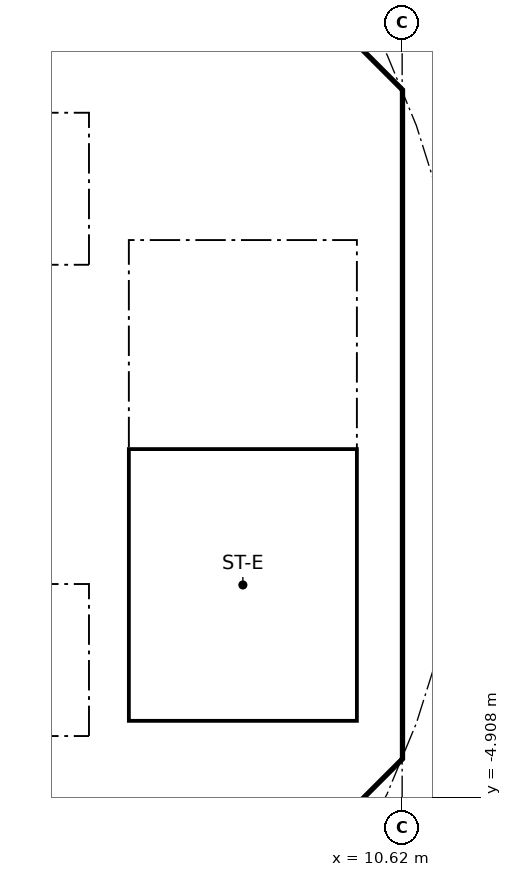
"""IFC4 building model, lengths in metres.
Left out: names, types, materials, properties, quantities, classifications, styles, units other than length and angle.
Written with IfcOpenShell. Run it as: python <this file> out.ifc"""

import sys

from ifc_helpers import new_model, si_unit, direction, frame, frame_2d, origin, place, context, subcontext, project, spatial, polyline, rectangle, outline, extrude, element, fill, save


model = new_model("IFC4")
c1 = context("Model", 3, precision=1e-05, world=origin(), true_north=direction((0.0, 1.0)))
c2 = subcontext(c1, "Body", "Model", "MODEL_VIEW")
j1 = project(units=[si_unit("LENGTHUNIT", "METRE"), si_unit("PLANEANGLEUNIT", "RADIAN")], contexts=[c1])
p1 = place(None, origin())
s1 = spatial("IfcSite", under=j1, at=p1, CompositionType="ELEMENT")
p2 = place(p1, origin())
s2 = spatial("IfcBuilding", under=s1, at=p2, CompositionType="ELEMENT")
p3 = place(p2, frame((0.0, 0.0, 284.4)))
s3 = spatial("IfcBuildingStorey", under=s2, at=p3, CompositionType="ELEMENT", Elevation=284.4)
p4 = place(p3, frame((9.988, 4.613, 0.0), z_axis=(0.0, 0.0, 1.0), x_axis=(-0.707106781187, 0.707106781187, 0.0)))
e1 = element("IfcWall", 1, at=p4, inside=s3, PredefinedType="SHEAR", context=c2, shape_type="SweptSolid", body=[
    extrude(rectangle(XDim=7.602, YDim=0.6, at=frame_2d((3.801, 0.0))), origin(), (0.0, 0.0, 1.0), 3.44),
])
p5 = place(p4, frame((3.201, 0.0, 0.0)))
e2 = element("IfcOpeningElement", 2, at=p5, cuts=e1, PredefinedType="OPENING", context=c2, shape_type="SweptSolid", body=[
    extrude(rectangle(XDim=1.2, YDim=2.1, at=frame_2d((0.6, 1.05))), frame((0.0, 0.31, 0.0), z_axis=(0.0, -1.0, 0.0), x_axis=(1.0, 0.0, 0.0)), (0.0, 0.0, 1.0), 0.62),
])
p6 = place(p3, frame((4.613, -9.988, 0.0), z_axis=(0.0, 0.0, 1.0), x_axis=(0.707106781187, 0.707106781187, 0.0)))
e3 = element("IfcWall", 3, at=p6, inside=s3, PredefinedType="SHEAR", context=c2, shape_type="SweptSolid", body=[
    extrude(rectangle(XDim=7.602, YDim=0.6, at=frame_2d((3.801, 0.0))), origin(), (0.0, 0.0, 1.0), 3.44),
])
p7 = place(p6, frame((3.201, 0.0, 0.0)))
e4 = element("IfcOpeningElement", 4, at=p7, cuts=e3, PredefinedType="OPENING", context=c2, shape_type="SweptSolid", body=[
    extrude(rectangle(XDim=1.2, YDim=2.1, at=frame_2d((0.6, 1.05))), frame((0.0, 0.31, 0.0), z_axis=(0.0, -1.0, 0.0), x_axis=(1.0, 0.0, 0.0)), (0.0, 0.0, 1.0), 0.62),
])
p8 = place(p3, frame((-6.7, 2.0, 0.0), z_axis=(0.0, 0.0, 1.0), x_axis=(1.0, 0.0, 0.0)))
e5 = element("IfcWall", 5, at=p8, inside=s3, PredefinedType="SOLIDWALL", context=c2, shape_type="SweptSolid", body=[
    extrude(rectangle(XDim=13.4, YDim=0.2, at=frame_2d((6.7, 0.0))), origin(), (0.0, 0.0, 1.0), 3.44),
])
p9 = place(p8, frame((11.65, 0.0, 0.0)))
e6 = element("IfcOpeningElement", 6, at=p9, cuts=e5, PredefinedType="OPENING", context=c2, shape_type="SweptSolid", body=[
    extrude(rectangle(XDim=1.1, YDim=2.1, at=frame_2d((0.55, 1.05))), frame((0.0, 0.11, 0.0), z_axis=(0.0, -1.0, 0.0), x_axis=(1.0, 0.0, 0.0)), (0.0, 0.0, 1.0), 0.22),
])
p10 = place(p8, frame((1.85, 0.0, 0.0)))
e7 = element("IfcOpeningElement", 7, at=p10, cuts=e5, PredefinedType="OPENING", context=c2, shape_type="SweptSolid", body=[
    extrude(rectangle(XDim=0.9, YDim=2.1, at=frame_2d((0.45, 1.05))), frame((0.0, 0.11, 0.0), z_axis=(0.0, -1.0, 0.0), x_axis=(1.0, 0.0, 0.0)), (0.0, 0.0, 1.0), 0.22),
])
p11 = place(p8, frame((5.15, 0.0, 0.0)))
e8 = element("IfcOpeningElement", 8, at=p11, cuts=e5, PredefinedType="OPENING", context=c2, shape_type="SweptSolid", body=[
    extrude(rectangle(XDim=0.9, YDim=2.1, at=frame_2d((0.45, 1.05))), frame((0.0, 0.11, 0.0), z_axis=(0.0, -1.0, 0.0), x_axis=(1.0, 0.0, 0.0)), (0.0, 0.0, 1.0), 0.22),
])
p12 = place(p8, frame((8.45, 0.0, 0.0)))
e9 = element("IfcOpeningElement", 9, at=p12, cuts=e5, PredefinedType="OPENING", context=c2, shape_type="SweptSolid", body=[
    extrude(rectangle(XDim=0.9, YDim=2.1, at=frame_2d((0.45, 1.05))), frame((0.0, 0.11, 0.0), z_axis=(0.0, -1.0, 0.0), x_axis=(1.0, 0.0, 0.0)), (0.0, 0.0, 1.0), 0.22),
])
p13 = place(p3, frame((6.7, 4.0, 0.0), z_axis=(0.0, 0.0, 1.0), x_axis=(1.0, 0.0, 0.0)))
e10 = element("IfcWall", 10, at=p13, inside=s3, PredefinedType="SOLIDWALL", context=c2, shape_type="SweptSolid", body=[
    extrude(rectangle(XDim=3.325, YDim=0.2, at=frame_2d((1.662, 0.0))), origin(), (0.0, 0.0, 1.0), 3.44),
])
p14 = place(p13, frame((1.25, 0.0, 0.0)))
e11 = element("IfcOpeningElement", 11, at=p14, cuts=e10, PredefinedType="OPENING", context=c2, shape_type="SweptSolid", body=[
    extrude(rectangle(XDim=1.1, YDim=2.1, at=frame_2d((0.55, 1.05))), frame((0.0, 0.11, 0.0), z_axis=(0.0, -1.0, 0.0), x_axis=(1.0, 0.0, 0.0)), (0.0, 0.0, 1.0), 0.22),
])
p15 = place(p3, frame((-6.7, -2.0, 0.0), z_axis=(0.0, 0.0, 1.0), x_axis=(1.0, 0.0, 0.0)))
e12 = element("IfcWall", 12, at=p15, inside=s3, PredefinedType="SOLIDWALL", context=c2, shape_type="SweptSolid", body=[
    extrude(rectangle(XDim=13.4, YDim=0.2, at=frame_2d((6.7, 0.0))), origin(), (0.0, 0.0, 1.0), 3.44),
])
p16 = place(p15, frame((9.45, 0.0, 0.0)))
e13 = element("IfcOpeningElement", 13, at=p16, cuts=e12, PredefinedType="OPENING", context=c2, shape_type="SweptSolid", body=[
    extrude(rectangle(XDim=1.1, YDim=2.1, at=frame_2d((0.55, 1.05))), frame((0.0, 0.11, 0.0), z_axis=(0.0, -1.0, 0.0), x_axis=(1.0, 0.0, 0.0)), (0.0, 0.0, 1.0), 0.22),
])
p17 = place(p15, frame((11.65, 0.0, 0.0)))
e14 = element("IfcOpeningElement", 14, at=p17, cuts=e12, PredefinedType="OPENING", context=c2, shape_type="SweptSolid", body=[
    extrude(rectangle(XDim=1.1, YDim=2.1, at=frame_2d((0.55, 1.05))), frame((0.0, 0.11, 0.0), z_axis=(0.0, -1.0, 0.0), x_axis=(1.0, 0.0, 0.0)), (0.0, 0.0, 1.0), 0.22),
])
p18 = place(p15, frame((1.85, 0.0, 0.0)))
e15 = element("IfcOpeningElement", 15, at=p18, cuts=e12, PredefinedType="OPENING", context=c2, shape_type="SweptSolid", body=[
    extrude(rectangle(XDim=0.9, YDim=2.1, at=frame_2d((0.45, 1.05))), frame((0.0, 0.11, 0.0), z_axis=(0.0, -1.0, 0.0), x_axis=(1.0, 0.0, 0.0)), (0.0, 0.0, 1.0), 0.22),
])
p19 = place(p15, frame((5.15, 0.0, 0.0)))
e16 = element("IfcOpeningElement", 16, at=p19, cuts=e12, PredefinedType="OPENING", context=c2, shape_type="SweptSolid", body=[
    extrude(rectangle(XDim=0.9, YDim=2.1, at=frame_2d((0.45, 1.05))), frame((0.0, 0.11, 0.0), z_axis=(0.0, -1.0, 0.0), x_axis=(1.0, 0.0, 0.0)), (0.0, 0.0, 1.0), 0.22),
])
p20 = place(p15, frame((7.35, 0.0, 0.0)))
e17 = element("IfcOpeningElement", 17, at=p20, cuts=e12, PredefinedType="OPENING", context=c2, shape_type="SweptSolid", body=[
    extrude(rectangle(XDim=0.9, YDim=2.1, at=frame_2d((0.45, 1.05))), frame((0.0, 0.11, 0.0), z_axis=(0.0, -1.0, 0.0), x_axis=(1.0, 0.0, 0.0)), (0.0, 0.0, 1.0), 0.22),
])
p21 = place(p3, origin())
e18 = element("IfcWall", 18, at=p21, inside=s3, PredefinedType="SHEAR", context=c2, shape_type="SweptSolid", body=[
    extrude(outline(polyline([(9.776, -4.401), (10.025, -4.152), (10.025, -3.801), (10.025, 4.152), (9.776, 4.401), (10.2, 4.825), (10.625, 4.401), (10.625, -4.401), (10.2, -4.825), (9.776, -4.401)])), origin(), (0.0, 0.0, 1.0), 3.44),
])
p22 = place(p3, origin())
e19 = element("IfcWall", 19, at=p22, inside=s3, PredefinedType="SOLIDWALL", context=c2, shape_type="SweptSolid", body=[
    extrude(outline(polyline([(-6.7, 4.3), (6.7, 4.3), (6.7, 2.1), (6.5, 2.1), (6.5, 4.1), (4.5, 4.1), (4.5, 2.1), (4.3, 2.1), (4.3, 4.1), (0.1, 4.1), (0.1, 2.1), (-0.1, 2.1), (-0.1, 4.1), (-2.1, 4.1), (-2.1, 2.1), (-2.3, 2.1), (-2.3, 4.1), (-6.5, 4.1), (-6.5, 2.1), (-6.7, 2.1), (-6.7, 4.3)])), origin(), (0.0, 0.0, 1.0), 3.44),
])
p23 = place(p3, origin())
e20 = element("IfcWall", 20, at=p23, inside=s3, PredefinedType="SOLIDWALL", context=c2, shape_type="SweptSolid", body=[
    extrude(outline(polyline([(-6.7, -2.1), (-6.5, -2.1), (-6.5, -4.1), (-2.3, -4.1), (-2.3, -2.1), (-2.1, -2.1), (-2.1, -4.1), (-0.1, -4.1), (-0.1, -2.1), (0.1, -2.1), (0.1, -4.1), (2.1, -4.1), (2.1, -2.1), (2.3, -2.1), (2.3, -4.1), (4.3, -4.1), (4.3, -2.1), (4.5, -2.1), (4.5, -4.1), (6.5, -4.1), (6.5, -2.1), (6.7, -2.1), (6.7, -4.3), (-6.7, -4.3), (-6.7, -2.1)])), origin(), (0.0, 0.0, 1.0), 3.44),
])
p24 = place(p3, origin())
e21 = element("IfcWall", 21, at=p24, inside=s3, PredefinedType="SOLIDWALL", context=c2, shape_type="SweptSolid", body=[
    extrude(outline(polyline([(7.025, -3.9), (6.7, -3.9), (6.7, 3.9), (7.025, 3.9), (7.025, -3.9)])), origin(), (0.0, 0.0, 1.0), 3.44),
])
p25 = place(p3, origin())
e22 = element("IfcWall", 22, at=p25, inside=s3, PredefinedType="SOLIDWALL", context=c2, shape_type="SweptSolid", body=[
    extrude(outline(polyline([(10.025, -4.1), (6.7, -4.1), (6.7, -3.9), (10.025, -3.9), (10.025, -4.1)])), origin(), (0.0, 0.0, 1.0), 3.44),
])
p26 = place(p9, origin())
e23 = element("IfcDoor", 23, at=p26, inside=s3, OperationType="DOUBLE_DOOR_SLIDING", PredefinedType="DOOR", context=c2, shape_type="SweptSolid", body=[
    extrude(rectangle(XDim=1.1, YDim=2.1, at=frame_2d((0.55, 1.05))), frame((0.0, 0.025, 0.0), z_axis=(0.0, -1.0, 0.0), x_axis=(1.0, 0.0, 0.0)), (0.0, 0.0, 1.0), 0.05),
])
fill(e6, e23)
p27 = place(p17, origin())
e24 = element("IfcDoor", 24, at=p27, inside=s3, OperationType="DOUBLE_DOOR_SLIDING", PredefinedType="DOOR", context=c2, shape_type="SweptSolid", body=[
    extrude(rectangle(XDim=1.1, YDim=2.1, at=frame_2d((0.55, 1.05))), frame((0.0, 0.025, 0.0), z_axis=(0.0, -1.0, 0.0), x_axis=(1.0, 0.0, 0.0)), (0.0, 0.0, 1.0), 0.05),
])
fill(e14, e24)
p28 = place(p14, frame((1.1, 0.0, 0.0), x_axis=(-1.0, 0.0, 0.0)))
e25 = element("IfcDoor", 25, at=p28, inside=s3, OperationType="SINGLE_SWING_LEFT", PredefinedType="DOOR", context=c2, shape_type="SweptSolid", body=[
    extrude(rectangle(XDim=1.1, YDim=2.1, at=frame_2d((0.55, 1.05))), frame((0.0, 0.025, 0.0), z_axis=(0.0, -1.0, 0.0), x_axis=(1.0, 0.0, 0.0)), (0.0, 0.0, 1.0), 0.05),
])
fill(e11, e25)
save(model, sys.argv[1])
